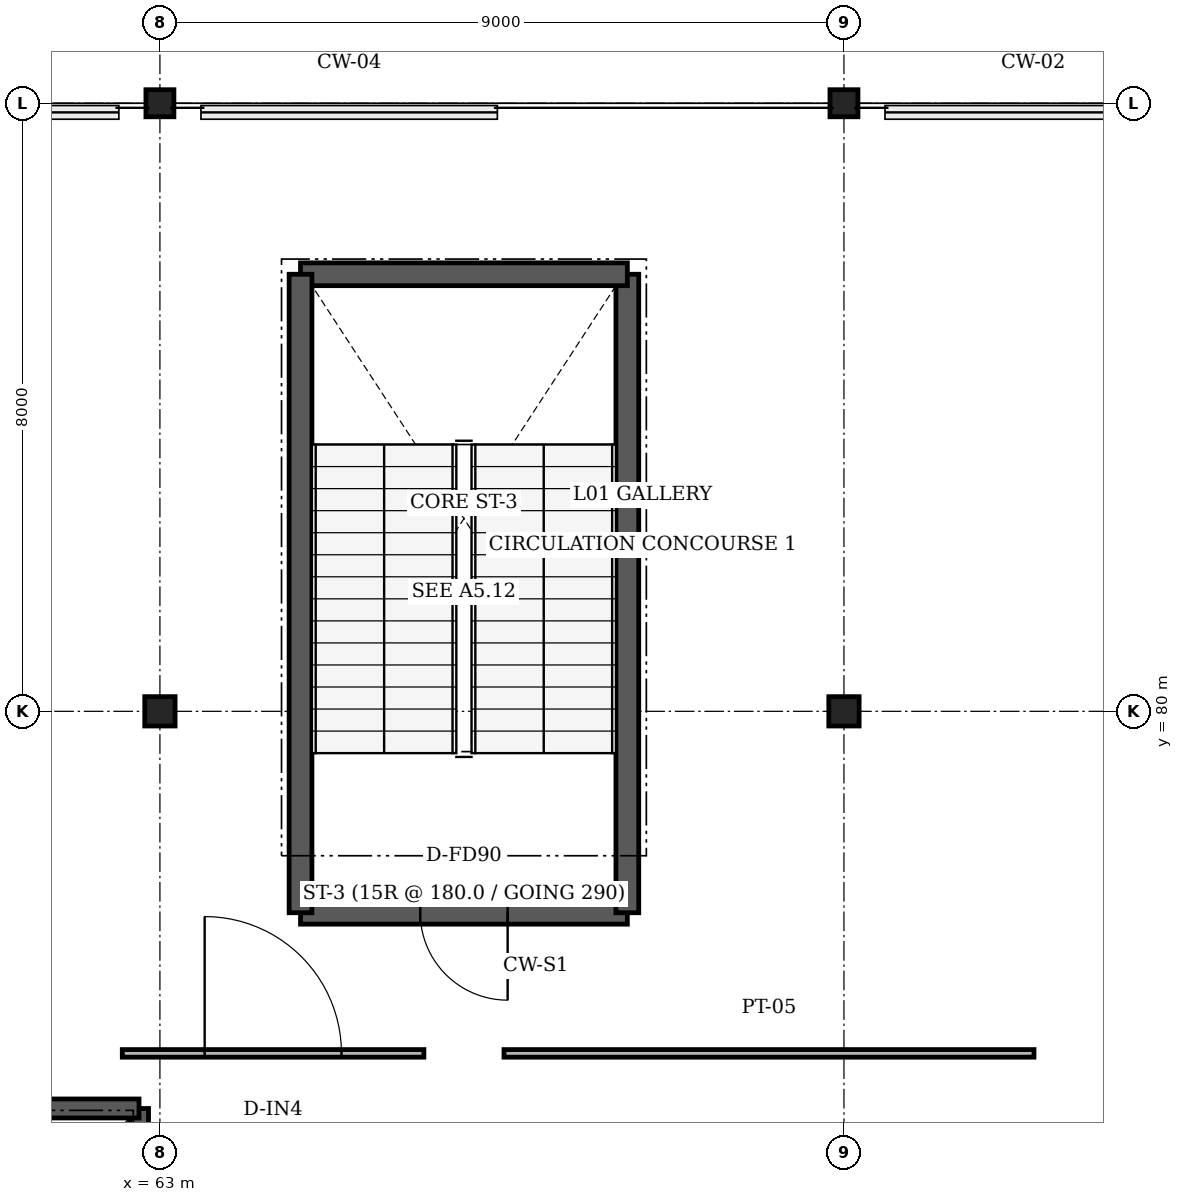
"""IFC4 building model, lengths in metres.
Left out: names, types, materials, properties, quantities, classifications, styles, units other than length and angle.
Written with IfcOpenShell. Run it as: python <this file> out.ifc"""

import sys

from ifc_helpers import new_model, si_unit, direction, frame, frame_2d, origin, origin_2d, place, context, subcontext, project, spatial, rectangle, i_section, extrude, element, fill, save


model = new_model("IFC4")
c1 = context("Model", 3, precision=1e-05, world=origin(), true_north=direction((0.0, 1.0)))
c2 = subcontext(c1, "Body", "Model", "MODEL_VIEW")
j1 = project(units=[si_unit("LENGTHUNIT", "METRE"), si_unit("PLANEANGLEUNIT", "RADIAN")], contexts=[c1])
p1 = place(None, origin())
s1 = spatial("IfcSite", under=j1, at=p1, CompositionType="ELEMENT")
p2 = place(p1, origin())
s2 = spatial("IfcBuilding", under=s1, at=p2, CompositionType="ELEMENT")
p3 = place(p2, frame((0.0, 0.0, 5.4)))
s3 = spatial("IfcBuildingStorey", under=s2, at=p3, CompositionType="ELEMENT", Elevation=5.4)
p4 = place(p3, frame((63.0, 80.0, 0.0), z_axis=(0.0, 0.0, 1.0), x_axis=(1.0, 0.0, 0.0)))
e1 = element("IfcColumn", 1, at=p4, inside=s3, PredefinedType="COLUMN", context=c2, shape_type="SweptSolid", body=[
    extrude(i_section(OverallWidth=0.399, OverallDepth=0.386, WebThickness=0.021, FlangeThickness=0.033, FilletRadius=0.015, at=origin_2d()), origin(), (0.0, 0.0, 1.0), 5.4),
])
p5 = place(p3, frame((63.0, 88.0, 0.0), z_axis=(0.0, 0.0, 1.0), x_axis=(1.0, 0.0, 0.0)))
e2 = element("IfcColumn", 2, at=p5, inside=s3, PredefinedType="COLUMN", context=c2, shape_type="SweptSolid", body=[
    extrude(i_section(OverallWidth=0.368, OverallDepth=0.356, WebThickness=0.011, FlangeThickness=0.018, FilletRadius=0.015, at=origin_2d()), origin(), (0.0, 0.0, 1.0), 5.4),
])
p6 = place(p3, frame((72.0, 80.0, 0.0), z_axis=(0.0, 0.0, 1.0), x_axis=(1.0, 0.0, 0.0)))
e3 = element("IfcColumn", 3, at=p6, inside=s3, PredefinedType="COLUMN", context=c2, shape_type="SweptSolid", body=[
    extrude(i_section(OverallWidth=0.399, OverallDepth=0.386, WebThickness=0.021, FlangeThickness=0.033, FilletRadius=0.015, at=origin_2d()), origin(), (0.0, 0.0, 1.0), 5.4),
])
p7 = place(p3, frame((72.0, 88.0, 0.0), z_axis=(0.0, 0.0, 1.0), x_axis=(1.0, 0.0, 0.0)))
e4 = element("IfcColumn", 4, at=p7, inside=s3, PredefinedType="COLUMN", context=c2, shape_type="SweptSolid", body=[
    extrude(i_section(OverallWidth=0.368, OverallDepth=0.356, WebThickness=0.011, FlangeThickness=0.018, FilletRadius=0.015, at=origin_2d()), origin(), (0.0, 0.0, 1.0), 5.4),
])
p8 = place(p3, frame((69.15, 77.35, 0.0), z_axis=(0.0, 0.0, 1.0), x_axis=(-1.0, 0.0, 0.0)))
e5 = element("IfcWall", 5, at=p8, inside=s3, PredefinedType="SOLIDWALL", context=c2, shape_type="SweptSolid", body=[
    extrude(rectangle(XDim=4.3, YDim=0.3, at=frame_2d((2.15, 0.0))), origin(), (0.0, 0.0, 1.0), 5.4),
])
p9 = place(p8, frame((1.575, 0.0, 0.0)))
e6 = element("IfcOpeningElement", 6, at=p9, cuts=e5, PredefinedType="OPENING", context=c2, shape_type="SweptSolid", body=[
    extrude(rectangle(XDim=1.15, YDim=2.2, at=frame_2d((0.575, 1.1))), frame((0.0, 0.16, 0.0), z_axis=(0.0, -1.0, 0.0), x_axis=(1.0, 0.0, 0.0)), (0.0, 0.0, 1.0), 0.32),
])
p10 = place(p3, frame((69.15, 77.35, 0.0), z_axis=(0.0, 0.0, 1.0), x_axis=(0.0, 1.0, 0.0)))
e7 = element("IfcWall", 7, at=p10, inside=s3, PredefinedType="SOLIDWALL", context=c2, shape_type="SweptSolid", body=[
    extrude(rectangle(XDim=8.4, YDim=0.3, at=frame_2d((4.2, 0.0))), origin(), (0.0, 0.0, 1.0), 5.4),
])
p11 = place(p3, frame((69.15, 85.75, 0.0), z_axis=(0.0, 0.0, 1.0), x_axis=(-1.0, 0.0, 0.0)))
e8 = element("IfcWall", 8, at=p11, inside=s3, PredefinedType="SOLIDWALL", context=c2, shape_type="SweptSolid", body=[
    extrude(rectangle(XDim=4.3, YDim=0.3, at=frame_2d((2.15, 0.0))), origin(), (0.0, 0.0, 1.0), 5.4),
])
p12 = place(p3, frame((64.85, 77.35, 0.0), z_axis=(0.0, 0.0, 1.0), x_axis=(0.0, 1.0, 0.0)))
e9 = element("IfcWall", 9, at=p12, inside=s3, PredefinedType="SOLIDWALL", context=c2, shape_type="SweptSolid", body=[
    extrude(rectangle(XDim=8.4, YDim=0.3, at=frame_2d((4.2, 0.0))), origin(), (0.0, 0.0, 1.0), 5.4),
])
p13 = place(p3, frame((62.725, 72.225, 0.0), z_axis=(0.0, 0.0, 1.0), x_axis=(0.0, 1.0, 0.0)))
e10 = element("IfcWall", 10, at=p13, inside=s3, PredefinedType="SOLIDWALL", context=c2, shape_type="SweptSolid", body=[
    extrude(rectangle(XDim=2.55, YDim=0.25, at=frame_2d((1.275, 0.0))), origin(), (0.0, 0.0, 1.0), 5.4),
])
p14 = place(p3, frame((62.725, 74.775, 0.0), z_axis=(0.0, 0.0, 1.0), x_axis=(-1.0, 0.0, 0.0)))
e11 = element("IfcWall", 11, at=p14, inside=s3, PredefinedType="SOLIDWALL", context=c2, shape_type="SweptSolid", body=[
    extrude(rectangle(XDim=2.45, YDim=0.25, at=frame_2d((1.225, 0.0))), origin(), (0.0, 0.0, 1.0), 5.4),
])
p15 = place(p3, frame((62.505, 75.5, 0.0), z_axis=(0.0, 0.0, 1.0), x_axis=(1.0, 0.0, 0.0)))
e12 = element("IfcWall", 12, at=p15, inside=s3, PredefinedType="PARTITIONING", context=c2, shape_type="SweptSolid", body=[
    extrude(rectangle(XDim=3.968, YDim=0.1, at=frame_2d((1.984, 0.0))), origin(), (0.0, 0.0, 1.0), 3.15),
])
p16 = place(p15, frame((1.084, 0.0, 0.0)))
e13 = element("IfcOpeningElement", 13, at=p16, cuts=e12, PredefinedType="OPENING", context=c2, shape_type="SweptSolid", body=[
    extrude(rectangle(XDim=1.8, YDim=2.3, at=frame_2d((0.9, 1.15))), frame((0.0, 0.06, 0.0), z_axis=(0.0, -1.0, 0.0), x_axis=(1.0, 0.0, 0.0)), (0.0, 0.0, 1.0), 0.12),
])
p17 = place(p3, frame((67.527, 75.5, 0.0), z_axis=(0.0, 0.0, 1.0), x_axis=(1.0, 0.0, 0.0)))
e14 = element("IfcWall", 14, at=p17, inside=s3, PredefinedType="PARTITIONING", context=c2, shape_type="SweptSolid", body=[
    extrude(rectangle(XDim=6.973, YDim=0.1, at=frame_2d((3.486, 0.0))), origin(), (0.0, 0.0, 1.0), 3.15),
])
p18 = place(p9, origin())
e15 = element("IfcDoor", 15, at=p18, inside=s3, OperationType="SINGLE_SWING_LEFT", PredefinedType="DOOR", context=c2, shape_type="SweptSolid", body=[
    extrude(rectangle(XDim=1.15, YDim=2.2, at=frame_2d((0.575, 1.1))), frame((0.0, 0.025, 0.0), z_axis=(0.0, -1.0, 0.0), x_axis=(1.0, 0.0, 0.0)), (0.0, 0.0, 1.0), 0.05),
])
fill(e6, e15)
p19 = place(p16, origin())
e16 = element("IfcDoor", 16, at=p19, inside=s3, OperationType="SINGLE_SWING_LEFT", PredefinedType="DOOR", context=c2, shape_type="SweptSolid", body=[
    extrude(rectangle(XDim=1.8, YDim=2.3, at=frame_2d((0.9, 1.15))), frame((0.0, 0.025, 0.0), z_axis=(0.0, -1.0, 0.0), x_axis=(1.0, 0.0, 0.0)), (0.0, 0.0, 1.0), 0.05),
])
fill(e13, e16)
save(model, sys.argv[1])
